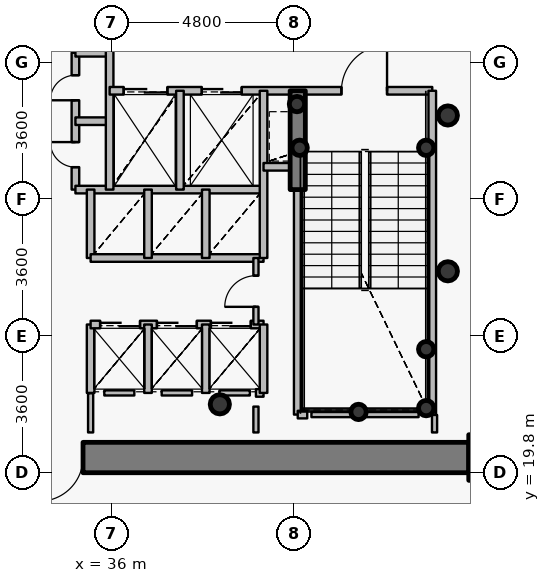
"""IFC4 building model, lengths in metres.
Left out: names, types, materials, properties, quantities, classifications, styles, units other than length and angle.
Written with IfcOpenShell. Run it as: python <this file> out.ifc"""

import sys

from ifc_helpers import new_model, si_unit, direction, frame, frame_2d, origin, origin_2d, place, context, subcontext, project, spatial, rectangle, hollow_circle, extrude, source, transform, mapped, element, fill, save


model = new_model("IFC4")
c1 = context("Model", 3, precision=1e-05, world=origin(), true_north=direction((0.0, 1.0)))
c2 = subcontext(c1, "Body", "Model", "MODEL_VIEW")
j1 = project(units=[si_unit("LENGTHUNIT", "METRE"), si_unit("PLANEANGLEUNIT", "RADIAN")], contexts=[c1])
p1 = place(None, origin())
s1 = spatial("IfcSite", under=j1, at=p1, CompositionType="ELEMENT")
p2 = place(p1, origin())
s2 = spatial("IfcBuilding", under=s1, at=p2, CompositionType="ELEMENT")
p3 = place(p2, frame((0.0, 0.0, 142.2)))
s3 = spatial("IfcBuildingStorey", under=s2, at=p3, CompositionType="ELEMENT", Elevation=142.2)
p4 = place(p3, frame((46.0, 20.2, 0.0), z_axis=(0.0, 0.0, 1.0), x_axis=(1.0, 0.0, 0.0)))
e1 = element("IfcColumn", 1, at=p4, inside=s3, PredefinedType="COLUMN", context=c2, shape_type="SweptSolid", body=[
    extrude(rectangle(XDim=1.2, YDim=1.2, at=origin_2d()), origin(), (0.0, 0.0, 1.0), 3.75),
])
p5 = place(p3, frame((38.85, 21.6, 0.0), z_axis=(0.0, 0.0, 1.0), x_axis=(1.0, 0.0, 0.0)))
e2 = element("IfcColumn", 2, at=p5, inside=s3, PredefinedType="COLUMN", context=c2, shape_type="SweptSolid", body=[
    extrude(hollow_circle(Radius=0.254, WallThickness=0.02, at=origin_2d()), origin(), (0.0, 0.0, 1.0), 3.75),
])
for number, where, z_axis, x_axis in (
    (3, (44.28, 21.5, 0.0), (0.0, 0.0, 1.0), (1.0, 0.0, 0.0)),
    (4, (44.28, 23.05, 0.0), (0.0, 0.0, 1.0), (1.0, 0.0, 0.0)),
    (5, (42.5, 21.4, 0.0), (0.0, 0.0, 1.0), (1.0, 0.0, 0.0)),
    (6, (40.95, 28.35, 0.0), (0.0, 0.0, 1.0), (1.0, 0.0, 0.0)),
    (7, (44.28, 28.35, 0.0), (0.0, 0.0, 1.0), (1.0, 0.0, 0.0)),
    (8, (40.88, 29.5, 0.0), (0.0, 0.0, 1.0), (1.0, 0.0, 0.0)),
):
    element("IfcColumn", number, at=place(p3, frame(where, z_axis=z_axis, x_axis=x_axis)), inside=s3, PredefinedType="COLUMN", context=c2, shape_type="SweptSolid", body=[
        extrude(hollow_circle(Radius=0.203, WallThickness=0.016, at=origin_2d()), origin(), (0.0, 0.0, 1.0), 3.75),
    ])
p6 = place(p3, frame((45.4, 20.2, 0.0), z_axis=(0.0, 0.0, 1.0), x_axis=(-1.0, 0.0, 0.0)))
e9 = element("IfcWall", 9, at=p6, inside=s3, PredefinedType="SHEAR", context=c2, shape_type="SweptSolid", body=[
    extrude(rectangle(XDim=18.8, YDim=0.8, at=frame_2d((9.4, 0.0))), origin(), (0.0, 0.0, 1.0), 2.9),
])
p7 = place(p6, frame((10.15, 0.0, 0.0)))
e10 = element("IfcOpeningElement", 10, at=p7, cuts=e9, PredefinedType="OPENING", context=c2, shape_type="SweptSolid", body=[
    extrude(rectangle(XDim=1.15, YDim=2.15, at=origin_2d()), frame((0.575, 0.41, 1.075), z_axis=(0.0, -1.0, 0.0), x_axis=(1.0, 0.0, 0.0)), (0.0, 0.0, 1.0), 0.82),
])
p8 = place(p3, frame((40.9, 27.25, 0.0), z_axis=(0.0, 0.0, 1.0), x_axis=(0.0, 1.0, 0.0)))
e11 = element("IfcWall", 11, at=p8, inside=s3, PredefinedType="SHEAR", context=c2, shape_type="SweptSolid", body=[
    extrude(rectangle(XDim=2.6, YDim=0.4, at=frame_2d((1.3, 0.0))), origin(), (0.0, 0.0, 1.0), 3.05),
])
for number, where, z_axis, x_axis in (
    (12, (44.85, 25.1, 0.0), (0.0, 0.0, 1.0), (1.0, 0.0, 0.0)),
    (13, (44.85, 29.2, 0.0), (0.0, 0.0, 1.0), (1.0, 0.0, 0.0)),
):
    element("IfcColumn", number, at=place(p3, frame(where, z_axis=z_axis, x_axis=x_axis)), inside=s3, PredefinedType="COLUMN", context=c2, shape_type="SweptSolid", body=[
        extrude(hollow_circle(Radius=0.254, WallThickness=0.02, at=origin_2d()), origin(), (0.0, 0.0, 1.0), 3.75),
    ])
p9 = place(p3, frame((35.05, 27.25, 0.0), z_axis=(0.0, 0.0, 1.0), x_axis=(0.0, 1.0, 0.0)))
e14 = element("IfcWall", 14, at=p9, inside=s3, PredefinedType="PARTITIONING", context=c2, shape_type="SweptSolid", body=[
    extrude(rectangle(XDim=3.6, YDim=0.2, at=frame_2d((1.8, 0.0))), origin(), (0.0, 0.0, 1.0), 3.45),
])
p10 = place(p9, frame((0.59, 0.0, 0.0)))
e15 = element("IfcOpeningElement", 15, at=p10, cuts=e14, PredefinedType="OPENING", context=c2, shape_type="SweptSolid", body=[
    extrude(rectangle(XDim=0.66, YDim=2.05, at=origin_2d()), frame((0.33, 0.11, 1.025), z_axis=(0.0, -1.0, 0.0), x_axis=(1.0, 0.0, 0.0)), (0.0, 0.0, 1.0), 0.22),
])
p11 = place(p9, frame((2.35, 0.0, 0.0)))
e16 = element("IfcOpeningElement", 16, at=p11, cuts=e14, PredefinedType="OPENING", context=c2, shape_type="SweptSolid", body=[
    extrude(rectangle(XDim=0.66, YDim=2.05, at=origin_2d()), frame((0.33, 0.11, 1.025), z_axis=(0.0, -1.0, 0.0), x_axis=(1.0, 0.0, 0.0)), (0.0, 0.0, 1.0), 0.22),
])
p12 = place(p3, frame((35.05, 27.25, 0.0), z_axis=(0.0, 0.0, 1.0), x_axis=(1.0, 0.0, 0.0)))
e17 = element("IfcWall", 17, at=p12, inside=s3, PredefinedType="PARTITIONING", context=c2, shape_type="SweptSolid", body=[
    extrude(rectangle(XDim=4.95, YDim=0.2, at=frame_2d((2.475, 0.0))), origin(), (0.0, 0.0, 1.0), 3.035),
])
for number, where, z_axis, x_axis in (
    (18, (35.05, 29.05, 0.0), (0.0, 0.0, 1.0), (1.0, 0.0, 0.0)),
    (19, (35.05, 30.85, 0.0), (0.0, 0.0, 1.0), (1.0, 0.0, 0.0)),
):
    element("IfcWall", number, at=place(p3, frame(where, z_axis=z_axis, x_axis=x_axis)), inside=s3, PredefinedType="PARTITIONING", context=c2, shape_type="SweptSolid", body=[
        extrude(rectangle(XDim=0.9, YDim=0.2, at=frame_2d((0.45, 0.0))), origin(), (0.0, 0.0, 1.0), 3.45),
    ])
p13 = place(p3, frame((35.45, 21.9, 0.0), z_axis=(0.0, 0.0, 1.0), x_axis=(0.0, 1.0, 0.0)))
e20 = element("IfcWall", 20, at=p13, inside=s3, PredefinedType="PARTITIONING", context=c2, shape_type="SweptSolid", body=[
    extrude(rectangle(XDim=1.8, YDim=0.2, at=frame_2d((0.9, 0.0))), origin(), (0.0, 0.0, 1.0), 3.45),
])
p14 = place(p3, frame((35.45, 23.7, 0.0), z_axis=(0.0, 0.0, 1.0), x_axis=(1.0, 0.0, 0.0)))
e21 = element("IfcWall", 21, at=p14, inside=s3, PredefinedType="PARTITIONING", context=c2, shape_type="SweptSolid", body=[
    extrude(rectangle(XDim=4.55, YDim=0.2, at=frame_2d((2.275, 0.0))), origin(), (0.0, 0.0, 1.0), 3.035),
])
p15 = place(p14, frame((0.25, 0.0, 0.0)))
e22 = element("IfcOpeningElement", 22, at=p15, cuts=e21, PredefinedType="OPENING", context=c2, shape_type="SweptSolid", body=[
    extrude(rectangle(XDim=1.05, YDim=2.15, at=origin_2d()), frame((0.525, 0.11, 1.075), z_axis=(0.0, -1.0, 0.0), x_axis=(1.0, 0.0, 0.0)), (0.0, 0.0, 1.0), 0.22),
])
p16 = place(p14, frame((1.745, 0.0, 0.0)))
e23 = element("IfcOpeningElement", 23, at=p16, cuts=e21, PredefinedType="OPENING", context=c2, shape_type="SweptSolid", body=[
    extrude(rectangle(XDim=1.05, YDim=2.15, at=origin_2d()), frame((0.525, 0.11, 1.075), z_axis=(0.0, -1.0, 0.0), x_axis=(1.0, 0.0, 0.0)), (0.0, 0.0, 1.0), 0.22),
])
p17 = place(p14, frame((3.165, 0.0, 0.0)))
e24 = element("IfcOpeningElement", 24, at=p17, cuts=e21, PredefinedType="OPENING", context=c2, shape_type="SweptSolid", body=[
    extrude(rectangle(XDim=1.05, YDim=2.15, at=origin_2d()), frame((0.525, 0.11, 1.075), z_axis=(0.0, -1.0, 0.0), x_axis=(1.0, 0.0, 0.0)), (0.0, 0.0, 1.0), 0.22),
])
p18 = place(p3, frame((35.45, 25.45, 0.0), z_axis=(0.0, 0.0, 1.0), x_axis=(0.0, 1.0, 0.0)))
e25 = element("IfcWall", 25, at=p18, inside=s3, PredefinedType="PARTITIONING", context=c2, shape_type="SweptSolid", body=[
    extrude(rectangle(XDim=1.8, YDim=0.2, at=frame_2d((0.9, 0.0))), origin(), (0.0, 0.0, 1.0), 3.45),
])
p19 = place(p3, frame((35.45, 25.45, 0.0), z_axis=(0.0, 0.0, 1.0), x_axis=(1.0, 0.0, 0.0)))
e26 = element("IfcWall", 26, at=p19, inside=s3, PredefinedType="PARTITIONING", context=c2, shape_type="SweptSolid", body=[
    extrude(rectangle(XDim=4.55, YDim=0.2, at=frame_2d((2.275, 0.0))), origin(), (0.0, 0.0, 1.0), 3.035),
])
p20 = place(p3, frame((35.95, 27.25, 0.0), z_axis=(0.0, 0.0, 1.0), x_axis=(0.0, 1.0, 0.0)))
e27 = element("IfcWall", 27, at=p20, inside=s3, PredefinedType="PARTITIONING", context=c2, shape_type="SweptSolid", body=[
    extrude(rectangle(XDim=3.8, YDim=0.2, at=frame_2d((1.9, 0.0))), origin(), (0.0, 0.0, 1.0), 3.45),
])
p21 = place(p3, frame((35.95, 29.85, 0.0), z_axis=(0.0, 0.0, 1.0), x_axis=(1.0, 0.0, 0.0)))
e28 = element("IfcWall", 28, at=p21, inside=s3, PredefinedType="PARTITIONING", context=c2, shape_type="SweptSolid", body=[
    extrude(rectangle(XDim=8.49, YDim=0.2, at=frame_2d((4.245, 0.0))), origin(), (0.0, 0.0, 1.0), 3.035),
])
p22 = place(p21, frame((6.1, 0.0, 0.0)))
e29 = element("IfcOpeningElement", 29, at=p22, cuts=e28, PredefinedType="OPENING", context=c2, shape_type="SweptSolid", body=[
    extrude(rectangle(XDim=1.2, YDim=2.15, at=origin_2d()), frame((0.6, 0.11, 1.075), z_axis=(0.0, -1.0, 0.0), x_axis=(1.0, 0.0, 0.0)), (0.0, 0.0, 1.0), 0.22),
])
p23 = place(p21, frame((0.37, 0.0, 0.0)))
e30 = element("IfcOpeningElement", 30, at=p23, cuts=e28, PredefinedType="OPENING", context=c2, shape_type="SweptSolid", body=[
    extrude(rectangle(XDim=1.15, YDim=2.15, at=origin_2d()), frame((0.575, 0.11, 1.075), z_axis=(0.0, -1.0, 0.0), x_axis=(1.0, 0.0, 0.0)), (0.0, 0.0, 1.0), 0.22),
])
p24 = place(p21, frame((2.425, 0.0, 0.0)))
e31 = element("IfcOpeningElement", 31, at=p24, cuts=e28, PredefinedType="OPENING", context=c2, shape_type="SweptSolid", body=[
    extrude(rectangle(XDim=1.05, YDim=2.15, at=origin_2d()), frame((0.525, 0.11, 1.075), z_axis=(0.0, -1.0, 0.0), x_axis=(1.0, 0.0, 0.0)), (0.0, 0.0, 1.0), 0.22),
])
for number, where, z_axis, x_axis in (
    (32, (36.96, 21.9, 0.0), (0.0, 0.0, 1.0), (0.0, 1.0, 0.0)),
    (33, (36.96, 25.45, 0.0), (0.0, 0.0, 1.0), (0.0, 1.0, 0.0)),
):
    element("IfcWall", number, at=place(p3, frame(where, z_axis=z_axis, x_axis=x_axis)), inside=s3, PredefinedType="PARTITIONING", context=c2, shape_type="SweptSolid", body=[
        extrude(rectangle(XDim=1.8, YDim=0.2, at=frame_2d((0.9, 0.0))), origin(), (0.0, 0.0, 1.0), 3.45),
    ])
p25 = place(p3, frame((37.8, 27.25, 0.0), z_axis=(0.0, 0.0, 1.0), x_axis=(0.0, 1.0, 0.0)))
e34 = element("IfcWall", 34, at=p25, inside=s3, PredefinedType="PARTITIONING", context=c2, shape_type="SweptSolid", body=[
    extrude(rectangle(XDim=2.6, YDim=0.2, at=frame_2d((1.3, 0.0))), origin(), (0.0, 0.0, 1.0), 3.45),
])
for number, where, z_axis, x_axis in (
    (35, (38.48, 21.9, 0.0), (0.0, 0.0, 1.0), (0.0, 1.0, 0.0)),
    (36, (38.48, 25.45, 0.0), (0.0, 0.0, 1.0), (0.0, 1.0, 0.0)),
):
    element("IfcWall", number, at=place(p3, frame(where, z_axis=z_axis, x_axis=x_axis)), inside=s3, PredefinedType="PARTITIONING", context=c2, shape_type="SweptSolid", body=[
        extrude(rectangle(XDim=1.8, YDim=0.2, at=frame_2d((0.9, 0.0))), origin(), (0.0, 0.0, 1.0), 3.45),
    ])
p26 = place(p3, frame((39.8, 21.9, 0.0), z_axis=(0.0, 0.0, 1.0), x_axis=(1.0, 0.0, 0.0)))
e37 = element("IfcWall", 37, at=p26, inside=s3, PredefinedType="PARTITIONING", context=c2, shape_type="SweptSolid", body=[
    extrude(rectangle(XDim=0.2, YDim=0.2, at=frame_2d((0.1, 0.0))), origin(), (0.0, 0.0, 1.0), 3.45),
])
p27 = place(p3, frame((39.8, 23.7, 0.0), z_axis=(0.0, 0.0, 1.0), x_axis=(0.0, 1.0, 0.0)))
e38 = element("IfcWall", 38, at=p27, inside=s3, PredefinedType="PARTITIONING", context=c2, shape_type="SweptSolid", body=[
    extrude(rectangle(XDim=1.75, YDim=0.135, at=frame_2d((0.875, 0.0))), origin(), (0.0, 0.0, 1.0), 3.45),
])
p28 = place(p27, frame((0.465, 0.0, 0.0)))
e39 = element("IfcOpeningElement", 39, at=p28, cuts=e38, PredefinedType="OPENING", context=c2, shape_type="SweptSolid", body=[
    extrude(rectangle(XDim=0.82, YDim=2.1, at=origin_2d()), frame((0.41, 0.078, 1.05), z_axis=(0.0, -1.0, 0.0), x_axis=(1.0, 0.0, 0.0)), (0.0, 0.0, 1.0), 0.155),
])
p29 = place(p3, frame((40.0, 21.9, 0.0), z_axis=(0.0, 0.0, 1.0), x_axis=(0.0, 1.0, 0.0)))
e40 = element("IfcWall", 40, at=p29, inside=s3, PredefinedType="PARTITIONING", context=c2, shape_type="SweptSolid", body=[
    extrude(rectangle(XDim=1.8, YDim=0.2, at=frame_2d((0.9, 0.0))), origin(), (0.0, 0.0, 1.0), 3.45),
])
p30 = place(p3, frame((40.0, 25.45, 0.0), z_axis=(0.0, 0.0, 1.0), x_axis=(0.0, 1.0, 0.0)))
e41 = element("IfcWall", 41, at=p30, inside=s3, PredefinedType="PARTITIONING", context=c2, shape_type="SweptSolid", body=[
    extrude(rectangle(XDim=4.4, YDim=0.2, at=frame_2d((2.2, 0.0))), origin(), (0.0, 0.0, 1.0), 3.45),
])
p31 = place(p3, frame((40.0, 27.85, 0.0), z_axis=(0.0, 0.0, 1.0), x_axis=(1.0, 0.0, 0.0)))
e42 = element("IfcWall", 42, at=p31, inside=s3, PredefinedType="PARTITIONING", context=c2, shape_type="SweptSolid", body=[
    extrude(rectangle(XDim=0.9, YDim=0.2, at=frame_2d((0.45, 0.0))), origin(), (0.0, 0.0, 1.0), 3.45),
])
p32 = place(p3, frame((40.9, 21.33, 0.0), z_axis=(0.0, 0.0, 1.0), x_axis=(0.0, 1.0, 0.0)))
e43 = element("IfcWall", 43, at=p32, inside=s3, PredefinedType="PARTITIONING", context=c2, shape_type="SweptSolid", body=[
    extrude(rectangle(XDim=5.91, YDim=0.2, at=frame_2d((2.955, 0.0))), origin(), (0.0, 0.0, 1.0), 2.985),
])
p33 = place(p3, frame((40.9, 21.33, 0.0), z_axis=(0.0, 0.0, 1.0), x_axis=(1.0, 0.0, 0.0)))
e44 = element("IfcWall", 44, at=p33, inside=s3, PredefinedType="PARTITIONING", context=c2, shape_type="SweptSolid", body=[
    extrude(rectangle(XDim=0.25, YDim=0.2, at=frame_2d((0.125, 0.0))), origin(), (0.0, 0.0, 1.0), 2.985),
])
p34 = place(p3, frame((44.44, 21.33, 0.0), z_axis=(0.0, 0.0, 1.0), x_axis=(0.0, 1.0, 0.0)))
e45 = element("IfcWall", 45, at=p34, inside=s3, PredefinedType="PARTITIONING", context=c2, shape_type="SweptSolid", body=[
    extrude(rectangle(XDim=8.52, YDim=0.2, at=frame_2d((4.26, 0.0))), origin(), (0.0, 0.0, 1.0), 3.45),
])
p35 = place(p3, frame((44.08, 21.33, 0.0), z_axis=(0.0, 0.0, 1.0), x_axis=(-1.0, 0.0, 0.0)))
e46 = element("IfcWall", 46, at=p35, inside=s3, PredefinedType="PARTITIONING", context=c2, shape_type="SweptSolid", body=[
    extrude(rectangle(XDim=2.82, YDim=0.135, at=frame_2d((1.41, 0.0))), origin(), (0.0, 0.0, 1.0), 2.985),
])
p36 = place(p3, frame((36.6, 21.9, 0.0), z_axis=(0.0, 0.0, 1.0), x_axis=(-1.0, 0.0, 0.0)))
e47 = element("IfcWall", 47, at=p36, inside=s3, PredefinedType="PARTITIONING", context=c2, shape_type="SweptSolid", body=[
    extrude(rectangle(XDim=0.79, YDim=0.135, at=frame_2d((0.395, 0.0))), origin(), (0.0, 0.0, 1.0), 3.45),
])
p37 = place(p3, frame((38.12, 21.9, 0.0), z_axis=(0.0, 0.0, 1.0), x_axis=(-1.0, 0.0, 0.0)))
e48 = element("IfcWall", 48, at=p37, inside=s3, PredefinedType="PARTITIONING", context=c2, shape_type="SweptSolid", body=[
    extrude(rectangle(XDim=0.8, YDim=0.135, at=frame_2d((0.4, 0.0))), origin(), (0.0, 0.0, 1.0), 3.45),
])
p38 = place(p3, frame((39.64, 21.9, 0.0), z_axis=(0.0, 0.0, 1.0), x_axis=(-1.0, 0.0, 0.0)))
e49 = element("IfcWall", 49, at=p38, inside=s3, PredefinedType="PARTITIONING", context=c2, shape_type="SweptSolid", body=[
    extrude(rectangle(XDim=0.8, YDim=0.135, at=frame_2d((0.4, 0.0))), origin(), (0.0, 0.0, 1.0), 3.035),
])
p39 = place(p3, frame((39.8, 20.86, 0.0), z_axis=(0.0, 0.0, 1.0), x_axis=(0.0, 1.0, 0.0)))
e50 = element("IfcWall", 50, at=p39, inside=s3, PredefinedType="PARTITIONING", context=c2, shape_type="SweptSolid", body=[
    extrude(rectangle(XDim=0.68, YDim=0.135, at=frame_2d((0.34, 0.0))), origin(), (0.0, 0.0, 1.0), 2.985),
])
p40 = place(p3, frame((44.5, 20.86, 0.0), z_axis=(0.0, 0.0, 1.0), x_axis=(0.0, 1.0, 0.0)))
e51 = element("IfcWall", 51, at=p40, inside=s3, PredefinedType="PARTITIONING", context=c2, shape_type="SweptSolid", body=[
    extrude(rectangle(XDim=0.46, YDim=0.135, at=frame_2d((0.23, 0.0))), origin(), (0.0, 0.0, 1.0), 3.45),
])
p41 = place(p3, frame((35.45, 21.89, 0.0), z_axis=(0.0, 0.0, 1.0), x_axis=(0.0, -1.0, 0.0)))
e52 = element("IfcWall", 52, at=p41, inside=s3, PredefinedType="PARTITIONING", context=c2, shape_type="SweptSolid", body=[
    extrude(rectangle(XDim=1.03, YDim=0.135, at=frame_2d((0.515, 0.0))), origin(), (0.0, 0.0, 1.0), 3.035),
])
p42 = place(p3, frame((45.41, 19.8, 0.0), z_axis=(0.0, 0.0, 1.0), x_axis=(1.0, 0.0, 0.0)))
e53 = element("IfcWall", 53, at=p42, inside=s3, PredefinedType="PARTITIONING", context=c2, shape_type="SweptSolid", body=[
    extrude(rectangle(XDim=0.99, YDim=0.135, at=frame_2d((0.495, 0.0))), origin(), (0.0, 0.0, 1.0), 2.885),
])
m1 = source(origin(), c2, "Body", "SweptSolid", [
    extrude(rectangle(XDim=1.15, YDim=2.15, at=origin_2d()), frame((0.575, 0.025, 1.075), z_axis=(0.0, -1.0, 0.0), x_axis=(1.0, 0.0, 0.0)), (0.0, 0.0, 1.0), 0.05),
])
p43 = place(p7, origin())
e54 = element("IfcDoor", 54, at=p43, inside=s3, OperationType="SINGLE_SWING_RIGHT", PredefinedType="DOOR", context=c2, shape_type="MappedRepresentation", body=[
    mapped(m1, transform((0.0, 0.0, 0.0), x_axis=(1.0, 0.0, 0.0), y_axis=(0.0, 1.0, 0.0), z_axis=(0.0, 0.0, 1.0), scale=1.0)),
])
fill(e10, e54)
m2 = source(origin(), c2, "Body", "SweptSolid", [
    extrude(rectangle(XDim=1.2, YDim=2.15, at=origin_2d()), frame((0.6, 0.025, 1.075), z_axis=(0.0, -1.0, 0.0), x_axis=(1.0, 0.0, 0.0)), (0.0, 0.0, 1.0), 0.05),
])
p44 = place(p22, origin())
e55 = element("IfcDoor", 55, at=p44, inside=s3, OperationType="SINGLE_SWING_RIGHT", PredefinedType="DOOR", context=c2, shape_type="MappedRepresentation", body=[
    mapped(m2, transform((0.0, 0.0, 0.0), x_axis=(1.0, 0.0, 0.0), y_axis=(0.0, 1.0, 0.0), z_axis=(0.0, 0.0, 1.0), scale=1.0)),
])
fill(e29, e55)
m3 = source(origin(), c2, "Body", "SweptSolid", [
    extrude(rectangle(XDim=1.15, YDim=2.15, at=origin_2d()), frame((0.575, 0.025, 1.075), z_axis=(0.0, -1.0, 0.0), x_axis=(1.0, 0.0, 0.0)), (0.0, 0.0, 1.0), 0.05),
])
p45 = place(p23, origin())
e56 = element("IfcDoor", 56, at=p45, inside=s3, OperationType="DOUBLE_DOOR_SLIDING", PredefinedType="USERDEFINED", context=c2, shape_type="MappedRepresentation", body=[
    mapped(m3, transform((0.0, 0.0, 0.0), x_axis=(1.0, 0.0, 0.0), y_axis=(0.0, 1.0, 0.0), z_axis=(0.0, 0.0, 1.0), scale=1.0)),
])
fill(e30, e56)
m4 = source(origin(), c2, "Body", "SweptSolid", [
    extrude(rectangle(XDim=1.05, YDim=2.15, at=origin_2d()), frame((0.525, 0.025, 1.075), z_axis=(0.0, -1.0, 0.0), x_axis=(1.0, 0.0, 0.0)), (0.0, 0.0, 1.0), 0.05),
])
p46 = place(p24, origin())
e57 = element("IfcDoor", 57, at=p46, inside=s3, OperationType="DOUBLE_DOOR_SLIDING", PredefinedType="USERDEFINED", context=c2, shape_type="MappedRepresentation", body=[
    mapped(m4, transform((0.0, 0.0, 0.0), x_axis=(1.0, 0.0, 0.0), y_axis=(0.0, 1.0, 0.0), z_axis=(0.0, 0.0, 1.0), scale=1.0)),
])
fill(e31, e57)
p47 = place(p15, origin())
e58 = element("IfcDoor", 58, at=p47, inside=s3, OperationType="DOUBLE_DOOR_SLIDING", PredefinedType="USERDEFINED", context=c2, shape_type="MappedRepresentation", body=[
    mapped(m4, transform((0.0, 0.0, 0.0), x_axis=(1.0, 0.0, 0.0), y_axis=(0.0, 1.0, 0.0), z_axis=(0.0, 0.0, 1.0), scale=1.0)),
])
fill(e22, e58)
p48 = place(p16, origin())
e59 = element("IfcDoor", 59, at=p48, inside=s3, OperationType="DOUBLE_DOOR_SLIDING", PredefinedType="USERDEFINED", context=c2, shape_type="MappedRepresentation", body=[
    mapped(m4, transform((0.0, 0.0, 0.0), x_axis=(1.0, 0.0, 0.0), y_axis=(0.0, 1.0, 0.0), z_axis=(0.0, 0.0, 1.0), scale=1.0)),
])
fill(e23, e59)
p49 = place(p17, origin())
e60 = element("IfcDoor", 60, at=p49, inside=s3, OperationType="DOUBLE_DOOR_SLIDING", PredefinedType="USERDEFINED", context=c2, shape_type="MappedRepresentation", body=[
    mapped(m4, transform((0.0, 0.0, 0.0), x_axis=(1.0, 0.0, 0.0), y_axis=(0.0, 1.0, 0.0), z_axis=(0.0, 0.0, 1.0), scale=1.0)),
])
fill(e24, e60)
m5 = source(origin(), c2, "Body", "SweptSolid", [
    extrude(rectangle(XDim=0.66, YDim=2.05, at=origin_2d()), frame((0.33, 0.025, 1.025), z_axis=(0.0, -1.0, 0.0), x_axis=(1.0, 0.0, 0.0)), (0.0, 0.0, 1.0), 0.05),
])
p50 = place(p10, origin())
e61 = element("IfcDoor", 61, at=p50, inside=s3, OperationType="SINGLE_SWING_RIGHT", PredefinedType="USERDEFINED", context=c2, shape_type="MappedRepresentation", body=[
    mapped(m5, transform((0.0, 0.0, 0.0), x_axis=(1.0, 0.0, 0.0), y_axis=(0.0, 1.0, 0.0), z_axis=(0.0, 0.0, 1.0), scale=1.0)),
])
fill(e15, e61)
p51 = place(p11, origin())
e62 = element("IfcDoor", 62, at=p51, inside=s3, OperationType="SINGLE_SWING_LEFT", PredefinedType="USERDEFINED", context=c2, shape_type="MappedRepresentation", body=[
    mapped(m5, transform((0.0, 0.0, 0.0), x_axis=(1.0, 0.0, 0.0), y_axis=(0.0, 1.0, 0.0), z_axis=(0.0, 0.0, 1.0), scale=1.0)),
])
fill(e16, e62)
m6 = source(origin(), c2, "Body", "SweptSolid", [
    extrude(rectangle(XDim=0.82, YDim=2.1, at=origin_2d()), frame((0.41, 0.025, 1.05), z_axis=(0.0, -1.0, 0.0), x_axis=(1.0, 0.0, 0.0)), (0.0, 0.0, 1.0), 0.05),
])
p52 = place(p28, origin())
e63 = element("IfcDoor", 63, at=p52, inside=s3, OperationType="SINGLE_SWING_LEFT", PredefinedType="DOOR", context=c2, shape_type="MappedRepresentation", body=[
    mapped(m6, transform((0.0, 0.0, 0.0), x_axis=(1.0, 0.0, 0.0), y_axis=(0.0, 1.0, 0.0), z_axis=(0.0, 0.0, 1.0), scale=1.0)),
])
fill(e39, e63)
save(model, sys.argv[1])
